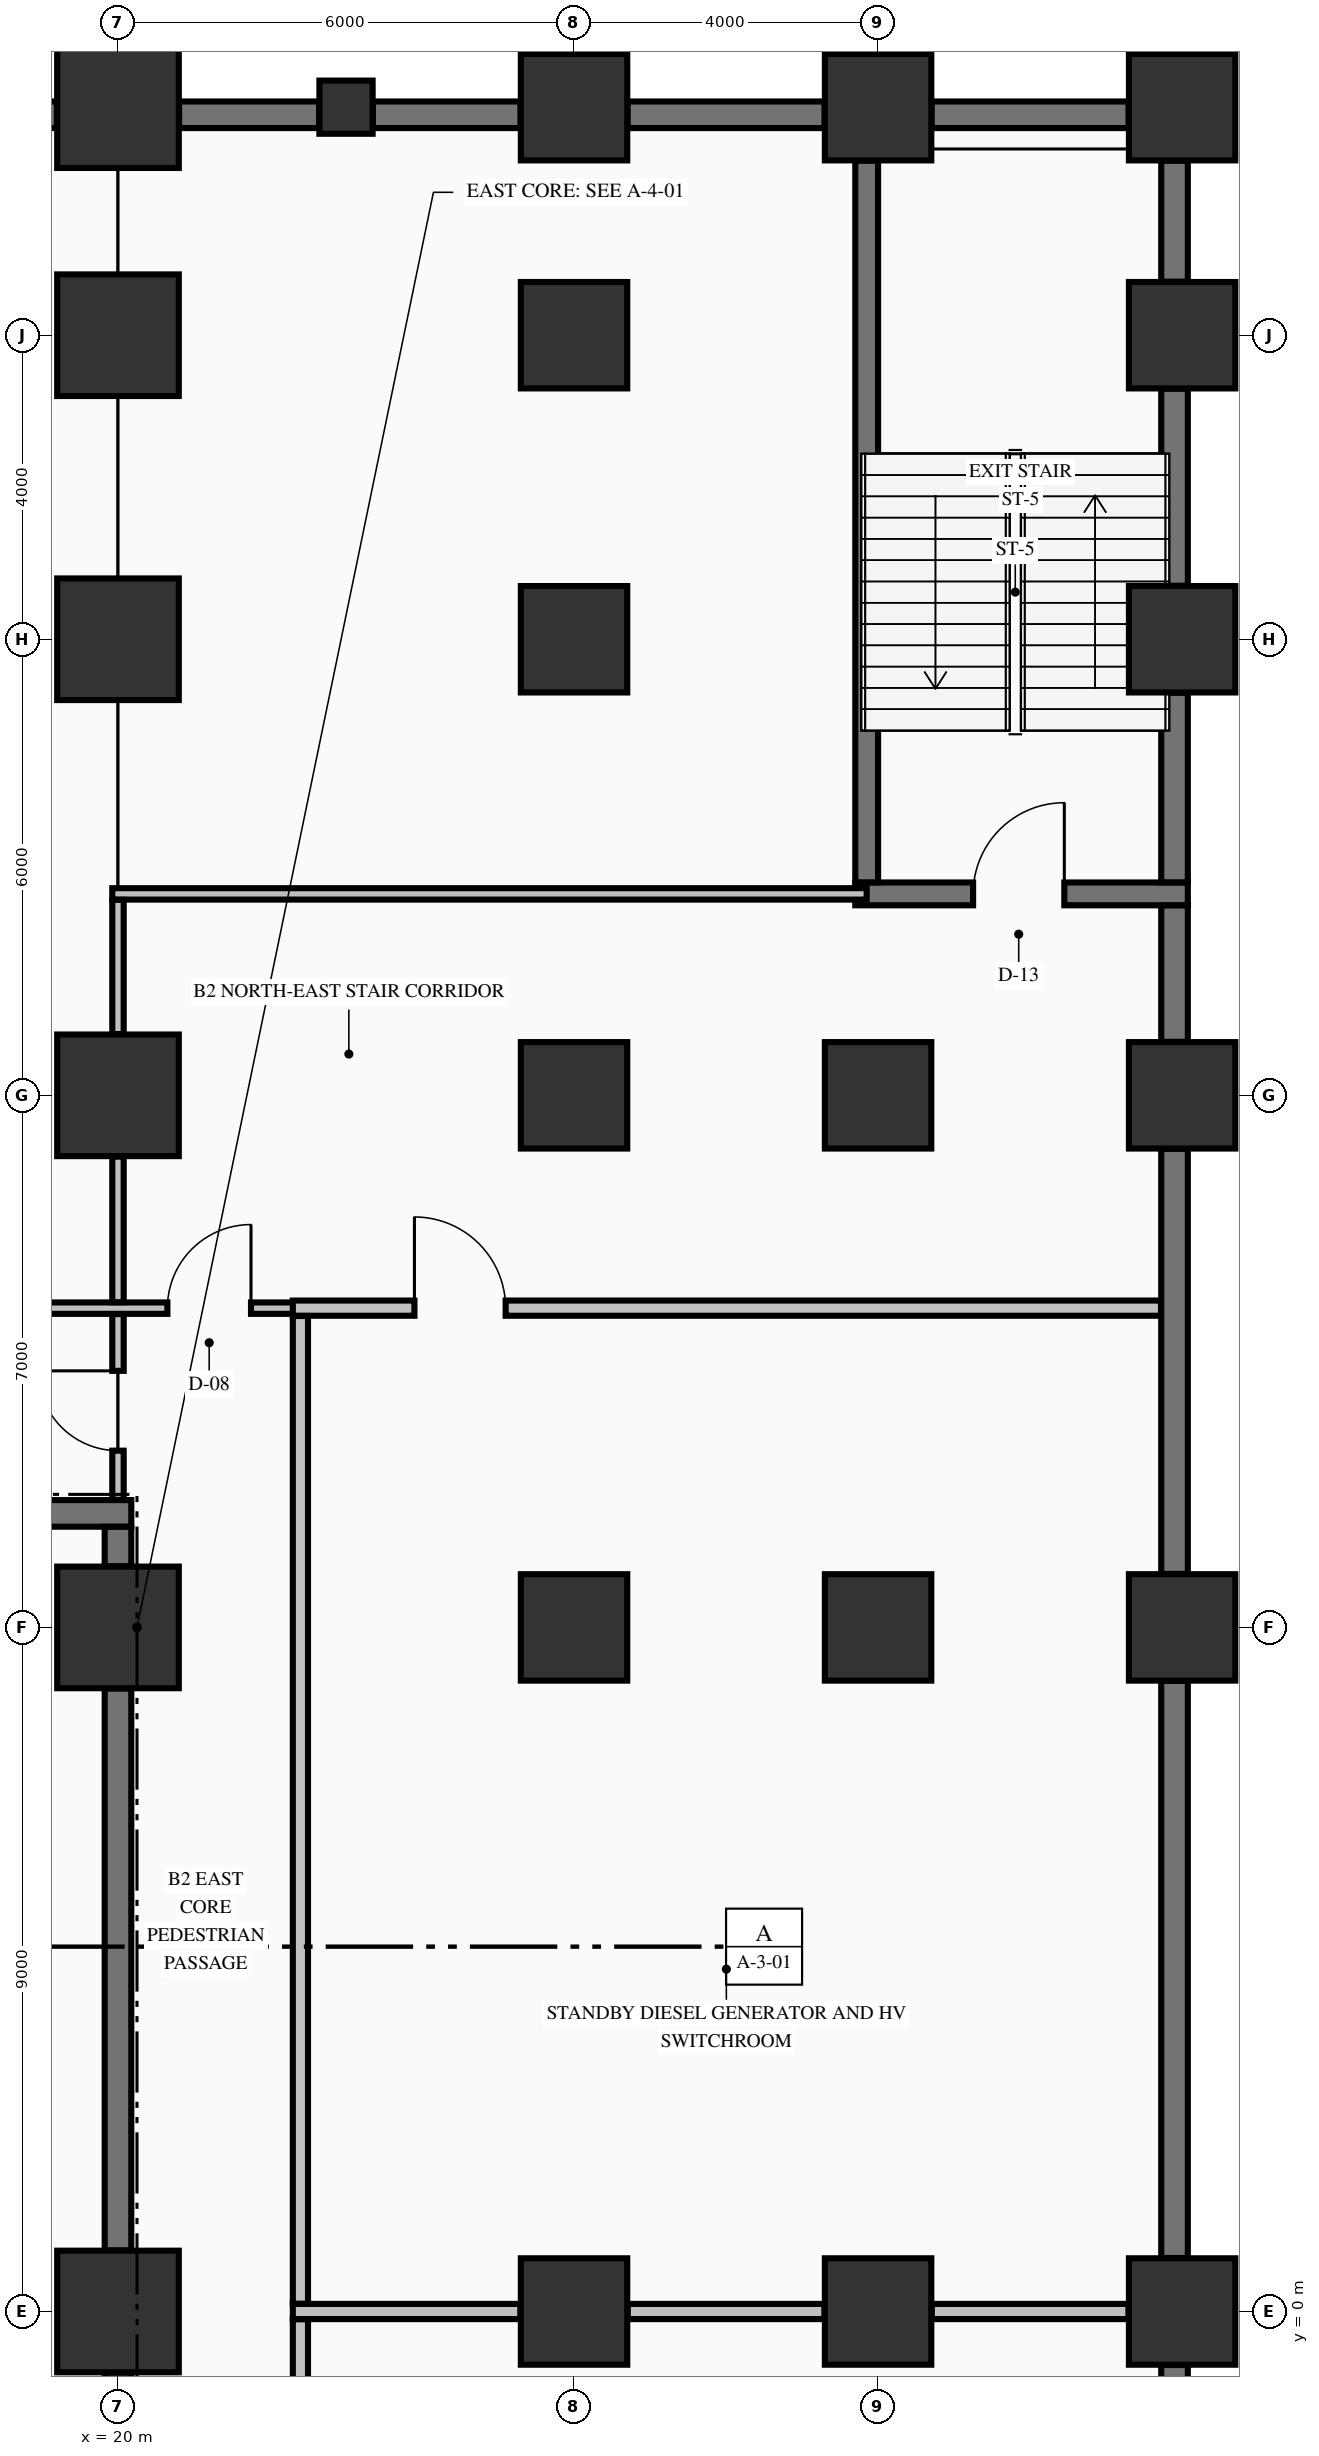
"""IFC4 building model, lengths in metres.
Left out: names, types, materials, properties, quantities, classifications, styles, units other than length and angle.
Written with IfcOpenShell. Run it as: python <this file> out.ifc"""

import sys

from ifc_helpers import new_model, si_unit, direction, frame, frame_2d, origin, origin_2d, place, context, subcontext, project, spatial, rectangle, extrude, element, fill, save


model = new_model("IFC4")
c1 = context("Model", 3, precision=1e-05, world=origin(), true_north=direction((0.0, 1.0)))
c2 = subcontext(c1, "Body", "Model", "MODEL_VIEW")
j1 = project(units=[si_unit("LENGTHUNIT", "METRE"), si_unit("PLANEANGLEUNIT", "RADIAN")], contexts=[c1])
p1 = place(None, origin())
s1 = spatial("IfcSite", under=j1, at=p1, CompositionType="ELEMENT")
p2 = place(p1, origin())
s2 = spatial("IfcBuilding", under=s1, at=p2, CompositionType="ELEMENT")
p3 = place(p2, frame((0.0, 0.0, -9.1)))
s3 = spatial("IfcBuildingStorey", under=s2, at=p3, CompositionType="ELEMENT", Elevation=-9.1)
for number, where, z_axis, x_axis in (
    (1, (20.0, 0.0, -0.45), (0.0, 0.0, 1.0), (1.0, 0.0, 0.0)),
    (2, (20.0, 9.0, -0.45), (0.0, 0.0, 1.0), (1.0, 0.0, 0.0)),
    (3, (20.0, 16.0, -0.45), (0.0, 0.0, 1.0), (1.0, 0.0, 0.0)),
    (4, (20.0, 22.0, -0.45), (0.0, 0.0, 1.0), (1.0, 0.0, 0.0)),
    (5, (20.0, 26.0, -0.45), (0.0, 0.0, 1.0), (1.0, 0.0, 0.0)),
    (6, (20.0, 29.0, -0.45), (0.0, 0.0, 1.0), (1.0, 0.0, 0.0)),
):
    element("IfcColumn", number, at=place(p3, frame(where, z_axis=z_axis, x_axis=x_axis)), inside=s3, PredefinedType="COLUMN", context=c2, shape_type="SweptSolid", body=[
        extrude(rectangle(XDim=1.6, YDim=1.6, at=origin_2d()), origin(), (0.0, 0.0, 1.0), 4.65),
    ])
for number, where, z_axis, x_axis in (
    (7, (26.0, 0.0, -0.45), (0.0, 0.0, 1.0), (1.0, 0.0, 0.0)),
    (8, (26.0, 9.0, -0.45), (0.0, 0.0, 1.0), (1.0, 0.0, 0.0)),
    (9, (26.0, 16.0, -0.45), (0.0, 0.0, 1.0), (1.0, 0.0, 0.0)),
    (10, (26.0, 22.0, -0.45), (0.0, 0.0, 1.0), (1.0, 0.0, 0.0)),
    (11, (26.0, 26.0, -0.45), (0.0, 0.0, 1.0), (1.0, 0.0, 0.0)),
    (12, (26.0, 29.0, -0.45), (0.0, 0.0, 1.0), (1.0, 0.0, 0.0)),
    (13, (30.0, 0.0, -0.45), (0.0, 0.0, 1.0), (1.0, 0.0, 0.0)),
    (14, (30.0, 9.0, -0.45), (0.0, 0.0, 1.0), (1.0, 0.0, 0.0)),
    (15, (30.0, 16.0, -0.45), (0.0, 0.0, 1.0), (1.0, 0.0, 0.0)),
    (16, (30.0, 29.0, -0.45), (0.0, 0.0, 1.0), (1.0, 0.0, 0.0)),
    (17, (34.0, 0.0, -0.45), (0.0, 0.0, 1.0), (1.0, 0.0, 0.0)),
    (18, (34.0, 9.0, -0.45), (0.0, 0.0, 1.0), (1.0, 0.0, 0.0)),
    (19, (34.0, 16.0, -0.45), (0.0, 0.0, 1.0), (1.0, 0.0, 0.0)),
    (20, (34.0, 22.0, -0.45), (0.0, 0.0, 1.0), (1.0, 0.0, 0.0)),
    (21, (34.0, 26.0, -0.45), (0.0, 0.0, 1.0), (1.0, 0.0, 0.0)),
    (22, (34.0, 29.0, -0.45), (0.0, 0.0, 1.0), (1.0, 0.0, 0.0)),
):
    element("IfcColumn", number, at=place(p3, frame(where, z_axis=z_axis, x_axis=x_axis)), inside=s3, PredefinedType="COLUMN", context=c2, shape_type="SweptSolid", body=[
        extrude(rectangle(XDim=1.4, YDim=1.4, at=origin_2d()), origin(), (0.0, 0.0, 1.0), 4.65),
    ])
p4 = place(p3, frame((23.0, 29.0, -0.45), z_axis=(0.0, 0.0, 1.0), x_axis=(1.0, 0.0, 0.0)))
e23 = element("IfcColumn", 23, at=p4, inside=s3, PredefinedType="PILASTER", context=c2, shape_type="SweptSolid", body=[
    extrude(rectangle(XDim=0.7, YDim=0.7, at=origin_2d()), origin(), (0.0, 0.0, 1.0), 4.65),
])
p5 = place(p3, frame((14.7, 10.5, 0.0), z_axis=(0.0, 0.0, 1.0), x_axis=(1.0, 0.0, 0.0)))
e24 = element("IfcWall", 24, at=p5, inside=s3, PredefinedType="SHEAR", context=c2, shape_type="SweptSolid", body=[
    extrude(rectangle(XDim=5.475, YDim=0.35, at=frame_2d((2.738, 0.0))), origin(), (0.0, 0.0, 1.0), 4.2),
])
p6 = place(p5, frame((2.1, 0.0, 0.0)))
e25 = element("IfcOpeningElement", 25, at=p6, cuts=e24, PredefinedType="OPENING", context=c2, shape_type="SweptSolid", body=[
    extrude(rectangle(XDim=1.1, YDim=2.15, at=frame_2d((0.55, 1.075))), frame((0.0, 0.185, 0.0), z_axis=(0.0, -1.0, 0.0), x_axis=(1.0, 0.0, 0.0)), (0.0, 0.0, 1.0), 0.37),
])
p7 = place(p3, frame((29.7, 18.65, 0.0), z_axis=(0.0, 0.0, 1.0), x_axis=(1.0, 0.0, 0.0)))
e26 = element("IfcWall", 26, at=p7, inside=s3, PredefinedType="SHEAR", context=c2, shape_type="SweptSolid", body=[
    extrude(rectangle(XDim=4.375, YDim=0.3, at=frame_2d((2.188, 0.0))), origin(), (0.0, 0.0, 1.0), 4.2),
])
p8 = place(p7, frame((1.55, 0.0, 0.0)))
e27 = element("IfcOpeningElement", 27, at=p8, cuts=e26, PredefinedType="OPENING", context=c2, shape_type="SweptSolid", body=[
    extrude(rectangle(XDim=1.2, YDim=2.15, at=frame_2d((0.6, 1.075))), frame((0.0, 0.16, 0.0), z_axis=(0.0, -1.0, 0.0), x_axis=(1.0, 0.0, 0.0)), (0.0, 0.0, 1.0), 0.32),
])
p9 = place(p3, frame((11.804, 28.9, 0.0), z_axis=(0.0, 0.0, 1.0), x_axis=(1.0, 0.0, 0.0)))
e28 = element("IfcWall", 28, at=p9, inside=s3, PredefinedType="SHEAR", context=c2, shape_type="SweptSolid", body=[
    extrude(rectangle(XDim=7.392, YDim=0.35, at=frame_2d((3.696, 0.0))), origin(), (0.0, 0.0, 1.0), 4.2),
])
p10 = place(p3, frame((20.804, 28.9, 0.0), z_axis=(0.0, 0.0, 1.0), x_axis=(1.0, 0.0, 0.0)))
e29 = element("IfcWall", 29, at=p10, inside=s3, PredefinedType="SHEAR", context=c2, shape_type="SweptSolid", body=[
    extrude(rectangle(XDim=1.842, YDim=0.35, at=frame_2d((0.921, 0.0))), origin(), (0.0, 0.0, 1.0), 4.2),
])
p11 = place(p3, frame((23.354, 28.9, 0.0), z_axis=(0.0, 0.0, 1.0), x_axis=(1.0, 0.0, 0.0)))
e30 = element("IfcWall", 30, at=p11, inside=s3, PredefinedType="SHEAR", context=c2, shape_type="SweptSolid", body=[
    extrude(rectangle(XDim=1.942, YDim=0.35, at=frame_2d((0.971, 0.0))), origin(), (0.0, 0.0, 1.0), 4.2),
])
for number, where, z_axis, x_axis in (
    (31, (26.704, 28.9, 0.0), (0.0, 0.0, 1.0), (1.0, 0.0, 0.0)),
    (32, (30.704, 28.9, 0.0), (0.0, 0.0, 1.0), (1.0, 0.0, 0.0)),
):
    element("IfcWall", number, at=place(p3, frame(where, z_axis=z_axis, x_axis=x_axis)), inside=s3, PredefinedType="SHEAR", context=c2, shape_type="SweptSolid", body=[
        extrude(rectangle(XDim=2.592, YDim=0.35, at=frame_2d((1.296, 0.0))), origin(), (0.0, 0.0, 1.0), 4.2),
    ])
p12 = place(p3, frame((22.3, 0.0, 0.0), z_axis=(0.0, 0.0, 1.0), x_axis=(1.0, 0.0, 0.0)))
e33 = element("IfcWall", 33, at=p12, inside=s3, PredefinedType="PARTITIONING", context=c2, shape_type="SweptSolid", body=[
    extrude(rectangle(XDim=2.994, YDim=0.2, at=frame_2d((1.497, 0.0))), origin(), (0.0, 0.0, 1.0), 3.242),
])
for number, where, z_axis, x_axis in (
    (34, (26.706, 0.0, 0.0), (0.0, 0.0, 1.0), (1.0, 0.0, 0.0)),
    (35, (30.706, 0.0, 0.0), (0.0, 0.0, 1.0), (1.0, 0.0, 0.0)),
):
    element("IfcWall", number, at=place(p3, frame(where, z_axis=z_axis, x_axis=x_axis)), inside=s3, PredefinedType="PARTITIONING", context=c2, shape_type="SweptSolid", body=[
        extrude(rectangle(XDim=2.588, YDim=0.2, at=frame_2d((1.294, 0.0))), origin(), (0.0, 0.0, 1.0), 3.242),
    ])
p13 = place(p3, frame((-22.5, 13.2, 0.0), z_axis=(0.0, 0.0, 1.0), x_axis=(1.0, 0.0, 0.0)))
e36 = element("IfcWall", 36, at=p13, inside=s3, PredefinedType="PARTITIONING", context=c2, shape_type="SweptSolid", body=[
    extrude(rectangle(XDim=45.0, YDim=0.15, at=frame_2d((22.5, 0.0))), origin(), (0.0, 0.0, 1.0), 4.2),
])
p14 = place(p13, frame((43.15, 0.0, 0.0)))
e37 = element("IfcOpeningElement", 37, at=p14, cuts=e36, PredefinedType="OPENING", context=c2, shape_type="SweptSolid", body=[
    extrude(rectangle(XDim=1.1, YDim=2.15, at=frame_2d((0.55, 1.075))), frame((0.0, 0.085, 0.0), z_axis=(0.0, -1.0, 0.0), x_axis=(1.0, 0.0, 0.0)), (0.0, 0.0, 1.0), 0.17),
])
p15 = place(p13, frame((27.4, 0.0, 0.0)))
e38 = element("IfcOpeningElement", 38, at=p15, cuts=e36, PredefinedType="OPENING", context=c2, shape_type="SweptSolid", body=[
    extrude(rectangle(XDim=1.2, YDim=2.15, at=frame_2d((0.6, 1.075))), frame((0.0, 0.085, 0.0), z_axis=(0.0, -1.0, 0.0), x_axis=(1.0, 0.0, 0.0)), (0.0, 0.0, 1.0), 0.17),
])
p16 = place(p3, frame((22.3, 13.2, 0.0), z_axis=(0.0, 0.0, 1.0), x_axis=(1.0, 0.0, 0.0)))
e39 = element("IfcWall", 39, at=p16, inside=s3, PredefinedType="PARTITIONING", context=c2, shape_type="SweptSolid", body=[
    extrude(rectangle(XDim=11.422, YDim=0.2, at=frame_2d((5.711, 0.0))), origin(), (0.0, 0.0, 1.0), 4.2),
])
p17 = place(p16, frame((1.6, 0.0, 0.0)))
e40 = element("IfcOpeningElement", 40, at=p17, cuts=e39, PredefinedType="OPENING", context=c2, shape_type="SweptSolid", body=[
    extrude(rectangle(XDim=1.2, YDim=2.15, at=frame_2d((0.6, 1.075))), frame((0.0, 0.11, 0.0), z_axis=(0.0, -1.0, 0.0), x_axis=(1.0, 0.0, 0.0)), (0.0, 0.0, 1.0), 0.22),
])
p18 = place(p3, frame((19.925, 18.65, 0.0), z_axis=(0.0, 0.0, 1.0), x_axis=(1.0, 0.0, 0.0)))
e41 = element("IfcWall", 41, at=p18, inside=s3, PredefinedType="PARTITIONING", context=c2, shape_type="SweptSolid", body=[
    extrude(rectangle(XDim=9.925, YDim=0.15, at=frame_2d((4.962, 0.0))), origin(), (0.0, 0.0, 1.0), 4.2),
])
for number, where, z_axis, x_axis in (
    (42, (20.0, -8.196, 0.0), (0.0, 0.0, 1.0), (0.0, 1.0, 0.0)),
    (43, (20.0, 0.804, 0.0), (0.0, 0.0, 1.0), (0.0, 1.0, 0.0)),
):
    element("IfcWall", number, at=place(p3, frame(where, z_axis=z_axis, x_axis=x_axis)), inside=s3, PredefinedType="SHEAR", context=c2, shape_type="SweptSolid", body=[
        extrude(rectangle(XDim=7.392, YDim=0.35, at=frame_2d((3.696, 0.0))), origin(), (0.0, 0.0, 1.0), 4.2),
    ])
p19 = place(p3, frame((20.0, 9.804, 0.0), z_axis=(0.0, 0.0, 1.0), x_axis=(0.0, 1.0, 0.0)))
e44 = element("IfcWall", 44, at=p19, inside=s3, PredefinedType="SHEAR", context=c2, shape_type="SweptSolid", body=[
    extrude(rectangle(XDim=0.519, YDim=0.35, at=frame_2d((0.26, 0.0))), origin(), (0.0, 0.0, 1.0), 4.2),
])
p20 = place(p3, frame((29.85, 18.802, 0.0), z_axis=(0.0, 0.0, 1.0), x_axis=(0.0, 1.0, 0.0)))
e45 = element("IfcWall", 45, at=p20, inside=s3, PredefinedType="SHEAR", context=c2, shape_type="SweptSolid", body=[
    extrude(rectangle(XDim=9.494, YDim=0.3, at=frame_2d((4.747, 0.0))), origin(), (0.0, 0.0, 1.0), 4.2),
])
for number, where, z_axis, x_axis in (
    (46, (33.9, -8.296, 0.0), (0.0, 0.0, 1.0), (0.0, 1.0, 0.0)),
    (47, (33.9, 0.704, 0.0), (0.0, 0.0, 1.0), (0.0, 1.0, 0.0)),
):
    element("IfcWall", number, at=place(p3, frame(where, z_axis=z_axis, x_axis=x_axis)), inside=s3, PredefinedType="SHEAR", context=c2, shape_type="SweptSolid", body=[
        extrude(rectangle(XDim=7.592, YDim=0.35, at=frame_2d((3.796, 0.0))), origin(), (0.0, 0.0, 1.0), 4.2),
    ])
p21 = place(p3, frame((33.9, 9.704, 0.0), z_axis=(0.0, 0.0, 1.0), x_axis=(0.0, 1.0, 0.0)))
e48 = element("IfcWall", 48, at=p21, inside=s3, PredefinedType="SHEAR", context=c2, shape_type="SweptSolid", body=[
    extrude(rectangle(XDim=5.592, YDim=0.35, at=frame_2d((2.796, 0.0))), origin(), (0.0, 0.0, 1.0), 4.2),
])
p22 = place(p3, frame((33.9, 16.704, 0.0), z_axis=(0.0, 0.0, 1.0), x_axis=(0.0, 1.0, 0.0)))
e49 = element("IfcWall", 49, at=p22, inside=s3, PredefinedType="SHEAR", context=c2, shape_type="SweptSolid", body=[
    extrude(rectangle(XDim=1.794, YDim=0.35, at=frame_2d((0.897, 0.0))), origin(), (0.0, 0.0, 1.0), 4.2),
])
p23 = place(p3, frame((33.9, 18.802, 0.0), z_axis=(0.0, 0.0, 1.0), x_axis=(0.0, 1.0, 0.0)))
e50 = element("IfcWall", 50, at=p23, inside=s3, PredefinedType="SHEAR", context=c2, shape_type="SweptSolid", body=[
    extrude(rectangle(XDim=2.494, YDim=0.35, at=frame_2d((1.247, 0.0))), origin(), (0.0, 0.0, 1.0), 4.2),
])
p24 = place(p3, frame((33.9, 22.704, 0.0), z_axis=(0.0, 0.0, 1.0), x_axis=(0.0, 1.0, 0.0)))
e51 = element("IfcWall", 51, at=p24, inside=s3, PredefinedType="SHEAR", context=c2, shape_type="SweptSolid", body=[
    extrude(rectangle(XDim=2.592, YDim=0.35, at=frame_2d((1.296, 0.0))), origin(), (0.0, 0.0, 1.0), 4.2),
])
p25 = place(p3, frame((33.9, 26.704, 0.0), z_axis=(0.0, 0.0, 1.0), x_axis=(0.0, 1.0, 0.0)))
e52 = element("IfcWall", 52, at=p25, inside=s3, PredefinedType="SHEAR", context=c2, shape_type="SweptSolid", body=[
    extrude(rectangle(XDim=1.592, YDim=0.35, at=frame_2d((0.796, 0.0))), origin(), (0.0, 0.0, 1.0), 4.2),
])
p26 = place(p3, frame((20.0, 10.678, 0.0), z_axis=(0.0, 0.0, 1.0), x_axis=(0.0, 1.0, 0.0)))
e53 = element("IfcWall", 53, at=p26, inside=s3, PredefinedType="PARTITIONING", context=c2, shape_type="SweptSolid", body=[
    extrude(rectangle(XDim=2.444, YDim=0.15, at=frame_2d((1.222, 0.0))), origin(), (0.0, 0.0, 1.0), 3.242),
])
p27 = place(p26, frame((0.647, 0.0, 0.0)))
e54 = element("IfcOpeningElement", 54, at=p27, cuts=e53, PredefinedType="OPENING", context=c2, shape_type="SweptSolid", body=[
    extrude(rectangle(XDim=1.05, YDim=2.15, at=frame_2d((0.525, 1.075))), frame((0.0, 0.085, 0.0), z_axis=(0.0, -1.0, 0.0), x_axis=(1.0, 0.0, 0.0)), (0.0, 0.0, 1.0), 0.17),
])
p28 = place(p3, frame((20.0, 13.278, 0.0), z_axis=(0.0, 0.0, 1.0), x_axis=(0.0, 1.0, 0.0)))
e55 = element("IfcWall", 55, at=p28, inside=s3, PredefinedType="PARTITIONING", context=c2, shape_type="SweptSolid", body=[
    extrude(rectangle(XDim=1.916, YDim=0.15, at=frame_2d((0.958, 0.0))), origin(), (0.0, 0.0, 1.0), 3.242),
])
p29 = place(p3, frame((20.0, 16.806, 0.0), z_axis=(0.0, 0.0, 1.0), x_axis=(0.0, 1.0, 0.0)))
e56 = element("IfcWall", 56, at=p29, inside=s3, PredefinedType="PARTITIONING", context=c2, shape_type="SweptSolid", body=[
    extrude(rectangle(XDim=1.766, YDim=0.15, at=frame_2d((0.883, 0.0))), origin(), (0.0, 0.0, 1.0), 3.242),
])
p30 = place(p3, frame((22.4, -12.497, 0.0), z_axis=(0.0, 0.0, 1.0), x_axis=(0.0, 1.0, 0.0)))
e57 = element("IfcWall", 57, at=p30, inside=s3, PredefinedType="PARTITIONING", context=c2, shape_type="SweptSolid", body=[
    extrude(rectangle(XDim=12.394, YDim=0.2, at=frame_2d((6.197, 0.0))), origin(), (0.0, 0.0, 1.0), 4.2),
])
p31 = place(p3, frame((22.4, 0.103, 0.0), z_axis=(0.0, 0.0, 1.0), x_axis=(0.0, 1.0, 0.0)))
e58 = element("IfcWall", 58, at=p31, inside=s3, PredefinedType="PARTITIONING", context=c2, shape_type="SweptSolid", body=[
    extrude(rectangle(XDim=12.994, YDim=0.2, at=frame_2d((6.497, 0.0))), origin(), (0.0, 0.0, 1.0), 4.2),
])
p32 = place(p8, origin())
e59 = element("IfcDoor", 59, at=p32, inside=s3, OperationType="SINGLE_SWING_RIGHT", PredefinedType="DOOR", context=c2, shape_type="SweptSolid", body=[
    extrude(rectangle(XDim=1.2, YDim=2.15, at=frame_2d((0.6, 1.075))), frame((0.0, 0.025, 0.0), z_axis=(0.0, -1.0, 0.0), x_axis=(1.0, 0.0, 0.0)), (0.0, 0.0, 1.0), 0.05),
])
fill(e27, e59)
p33 = place(p27, origin())
e60 = element("IfcDoor", 60, at=p33, inside=s3, OperationType="SINGLE_SWING_RIGHT", PredefinedType="DOOR", context=c2, shape_type="SweptSolid", body=[
    extrude(rectangle(XDim=1.05, YDim=2.15, at=frame_2d((0.525, 1.075))), frame((0.0, 0.025, 0.0), z_axis=(0.0, -1.0, 0.0), x_axis=(1.0, 0.0, 0.0)), (0.0, 0.0, 1.0), 0.05),
])
fill(e54, e60)
p34 = place(p14, origin())
e61 = element("IfcDoor", 61, at=p34, inside=s3, OperationType="SINGLE_SWING_RIGHT", PredefinedType="DOOR", context=c2, shape_type="SweptSolid", body=[
    extrude(rectangle(XDim=1.1, YDim=2.15, at=frame_2d((0.55, 1.075))), frame((0.0, 0.025, 0.0), z_axis=(0.0, -1.0, 0.0), x_axis=(1.0, 0.0, 0.0)), (0.0, 0.0, 1.0), 0.05),
])
fill(e37, e61)
p35 = place(p17, origin())
e62 = element("IfcDoor", 62, at=p35, inside=s3, OperationType="SINGLE_SWING_LEFT", PredefinedType="DOOR", context=c2, shape_type="SweptSolid", body=[
    extrude(rectangle(XDim=1.2, YDim=2.15, at=frame_2d((0.6, 1.075))), frame((0.0, 0.025, 0.0), z_axis=(0.0, -1.0, 0.0), x_axis=(1.0, 0.0, 0.0)), (0.0, 0.0, 1.0), 0.05),
])
fill(e40, e62)
save(model, sys.argv[1])
